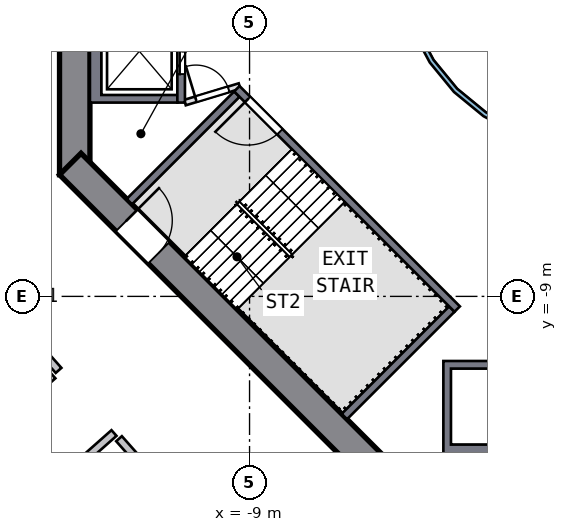
"""IFC4 building model, lengths in metres.
Left out: names, types, materials, properties, quantities, classifications, styles, units other than length and angle.
Written with IfcOpenShell. Run it as: python <this file> out.ifc"""

import sys

from ifc_helpers import new_model, si_unit, direction, frame, frame_2d, origin, place, context, subcontext, project, spatial, polyline, rectangle, outline, extrude, element, fill, save


model = new_model("IFC4")
c1 = context("Model", 3, precision=1e-05, world=origin(), true_north=direction((0.0, 1.0)))
c2 = subcontext(c1, "Body", "Model", "MODEL_VIEW")
j1 = project(units=[si_unit("LENGTHUNIT", "METRE"), si_unit("PLANEANGLEUNIT", "RADIAN")], contexts=[c1])
p1 = place(None, origin())
s1 = spatial("IfcSite", under=j1, at=p1, CompositionType="ELEMENT")
p2 = place(p1, origin())
s2 = spatial("IfcBuilding", under=s1, at=p2, CompositionType="ELEMENT")
p3 = place(p2, frame((0.0, 0.0, 81.0)))
s3 = spatial("IfcBuildingStorey", under=s2, at=p3, CompositionType="ELEMENT", Elevation=81.0)
p4 = place(p3, frame((-13.6, 5.799, 0.0), z_axis=(0.0, 0.0, 1.0), x_axis=(0.0, -1.0, 0.0)))
e1 = element("IfcWall", 1, at=p4, inside=s3, PredefinedType="SHEAR", context=c2, shape_type="SweptSolid", body=[
    extrude(rectangle(XDim=11.598, YDim=0.8, at=frame_2d((5.799, 0.0))), origin(), (0.0, 0.0, 1.0), 5.0),
])
p5 = place(p4, frame((4.899, 0.0, 0.0)))
e2 = element("IfcOpeningElement", 2, at=p5, cuts=e1, PredefinedType="OPENING", context=c2, shape_type="SweptSolid", body=[
    extrude(rectangle(XDim=1.8, YDim=2.1, at=frame_2d((0.9, 1.05))), frame((0.0, 0.41, 0.0), z_axis=(0.0, -1.0, 0.0), x_axis=(1.0, 0.0, 0.0)), (0.0, 0.0, 1.0), 0.82),
])
p6 = place(p3, frame((-13.717, -5.516, 0.0), z_axis=(0.0, 0.0, 1.0), x_axis=(0.707106781, -0.707106781, 0.0)))
e3 = element("IfcWall", 3, at=p6, inside=s3, PredefinedType="SHEAR", context=c2, shape_type="SweptSolid", body=[
    extrude(rectangle(XDim=11.598, YDim=0.8, at=frame_2d((5.799, 0.0))), origin(), (0.0, 0.0, 1.0), 5.0),
])
p7 = place(p6, frame((2.099, 0.0, 0.0)))
e4 = element("IfcOpeningElement", 4, at=p7, cuts=e3, PredefinedType="OPENING", context=c2, shape_type="SweptSolid", body=[
    extrude(rectangle(XDim=1.2, YDim=2.1, at=frame_2d((0.6, 1.05))), frame((0.0, 0.41, 0.0), z_axis=(0.0, -1.0, 0.0), x_axis=(1.0, 0.0, 0.0)), (0.0, 0.0, 1.0), 0.82),
])
p8 = place(p3, origin())
e5 = element("IfcWall", 5, at=p8, inside=s3, PredefinedType="SOLIDWALL", context=c2, shape_type="SweptSolid", body=[
    extrude(outline(polyline([(-13.2, -3.9), (-13.2, -1.2), (-10.9, -1.2), (-10.9, -1.4), (-12.9, -1.4), (-12.9, -3.7), (-10.9, -3.7), (-10.9, -3.9), (-13.2, -3.9)])), origin(), (0.0, 0.0, 1.0), 4.69),
])
p9 = place(p3, frame((-10.8, -1.2, 0.0), z_axis=(0.0, 0.0, 1.0), x_axis=(0.0, -1.0, 0.0)))
e6 = element("IfcWall", 6, at=p9, inside=s3, PredefinedType="SOLIDWALL", context=c2, shape_type="SweptSolid", body=[
    extrude(rectangle(XDim=2.7, YDim=0.2, at=frame_2d((1.35, 0.0))), origin(), (0.0, 0.0, 1.0), 4.69),
])
p10 = place(p9, frame((0.75, 0.0, 0.0)))
e7 = element("IfcOpeningElement", 7, at=p10, cuts=e6, PredefinedType="OPENING", context=c2, shape_type="SweptSolid", body=[
    extrude(rectangle(XDim=1.2, YDim=2.1, at=frame_2d((0.6, 1.05))), frame((0.0, 0.11, 0.0), z_axis=(0.0, -1.0, 0.0), x_axis=(1.0, 0.0, 0.0)), (0.0, 0.0, 1.0), 0.22),
])
p11 = place(p3, origin())
e8 = element("IfcWall", 8, at=p11, inside=s3, PredefinedType="SOLIDWALL", context=c2, shape_type="SweptSolid", body=[
    extrude(outline(polyline([(-1.2, -13.2), (-3.9, -13.2), (-3.9, -10.7), (-1.2, -10.7), (-1.2, -13.2)]), holes=[polyline([(-3.7, -10.9), (-3.7, -12.9), (-1.4, -12.9), (-1.4, -10.9), (-3.7, -10.9)])]), origin(), (0.0, 0.0, 1.0), 4.69),
])
p12 = place(p3, frame((-3.535, -9.334, 0.0), z_axis=(0.0, 0.0, 1.0), x_axis=(-0.707106781, 0.707106781, 0.0)))
e9 = element("IfcWall", 9, at=p12, inside=s3, PredefinedType="SOLIDWALL", context=c2, shape_type="SweptSolid", body=[
    extrude(rectangle(XDim=8.2, YDim=0.2, at=frame_2d((4.1, 0.0))), origin(), (0.0, 0.0, 1.0), 4.69),
])
p13 = place(p12, frame((6.6, 0.0, 0.0)))
e10 = element("IfcOpeningElement", 10, at=p13, cuts=e9, PredefinedType="OPENING", context=c2, shape_type="SweptSolid", body=[
    extrude(rectangle(XDim=1.2, YDim=2.1, at=frame_2d((0.6, 1.05))), frame((0.0, 0.11, 0.0), z_axis=(0.0, -1.0, 0.0), x_axis=(1.0, 0.0, 0.0)), (0.0, 0.0, 1.0), 0.22),
])
for number, where, z_axis, x_axis in (
    (11, (-9.334, -3.677, 0.0), (0.0, 0.0, 1.0), (-0.707, -0.707, 0.0)),
    (12, (-3.677, -9.334, 0.0), (0.0, 0.0, 1.0), (-0.707, -0.707, 0.0)),
):
    element("IfcWall", number, at=place(p3, frame(where, z_axis=z_axis, x_axis=x_axis)), inside=s3, PredefinedType="SOLIDWALL", context=c2, shape_type="SweptSolid", body=[
        extrude(rectangle(XDim=4.0, YDim=0.2, at=frame_2d((2.0, 0.0))), origin(), (0.0, 0.0, 1.0), 4.69),
    ])
p14 = place(p3, frame((-10.7, -3.9, 0.0), z_axis=(0.0, 0.0, 1.0), x_axis=(0.957084567, 0.289808785, 0.0)))
e13 = element("IfcWall", 13, at=p14, inside=s3, PredefinedType="PARTITIONING", context=c2, shape_type="SweptSolid", body=[
    extrude(rectangle(XDim=1.501, YDim=0.15, at=frame_2d((0.75, 0.0))), origin(), (0.0, 0.0, 1.0), 4.69),
])
p15 = place(p14, frame((0.301, 0.0, 0.0)))
e14 = element("IfcOpeningElement", 14, at=p15, cuts=e13, PredefinedType="OPENING", context=c2, shape_type="SweptSolid", body=[
    extrude(rectangle(XDim=0.9, YDim=2.1, at=frame_2d((0.45, 1.05))), frame((0.0, 0.085, 0.0), z_axis=(0.0, -1.0, 0.0), x_axis=(1.0, 0.0, 0.0)), (0.0, 0.0, 1.0), 0.17),
])
p16 = place(p3, origin())
e15 = element("IfcWall", 15, at=p16, inside=s3, PredefinedType="SOLIDWALL", context=c2, shape_type="SweptSolid", body=[
    extrude(outline(polyline([(5.021, -0.999), (4.73, -1.959), (4.257, -2.844), (3.62, -3.62), (2.844, -4.257), (1.959, -4.73), (0.999, -5.021), (0.0, -5.12), (-0.999, -5.021), (-1.959, -4.73), (-2.844, -4.257), (-3.62, -3.62), (-4.257, -2.844), (-4.73, -1.959), (-5.021, -0.999), (-5.12, 0.0), (-5.021, 0.999), (-4.73, 1.959), (-4.257, 2.844), (-3.62, 3.62), (-2.844, 4.257), (-1.959, 4.73), (-0.999, 5.021), (0.0, 5.12), (0.999, 5.021), (1.959, 4.73), (2.844, 4.257), (3.62, 3.62), (4.257, 2.844), (4.73, 1.959), (5.021, 0.999), (5.12, 0.0), (5.021, -0.999)]), holes=[polyline([(4.904, 0.976), (4.619, 1.913), (4.157, 2.778), (3.535, 3.535), (2.778, 4.157), (1.913, 4.619), (0.976, 4.904), (0.0, 5.0), (-0.976, 4.904), (-1.913, 4.619), (-2.778, 4.157), (-3.535, 3.535), (-4.157, 2.778), (-4.619, 1.913), (-4.904, 0.976), (-5.0, 0.0), (-4.904, -0.976), (-4.619, -1.913), (-4.157, -2.778), (-3.535, -3.535), (-2.778, -4.157), (-1.913, -4.619), (-0.976, -4.904), (0.0, -5.0), (0.976, -4.904), (1.913, -4.619), (2.778, -4.157), (3.535, -3.535), (4.157, -2.778), (4.619, -1.913), (4.904, -0.976), (5.0, 0.0), (4.904, 0.976)])]), origin(), (0.0, 0.0, 1.0), 4.69),
])
p17 = place(p3, frame((-29.293, -24.465, 0.0), z_axis=(0.0, 0.0, 1.0), x_axis=(0.74872671, 0.662878808, 0.0)))
e16 = element("IfcWall", 16, at=p17, inside=s3, PredefinedType="SOLIDWALL", context=c2, shape_type="SweptSolid", body=[
    extrude(rectangle(XDim=20.191, YDim=0.2, at=frame_2d((10.096, 0.0))), origin(), (0.0, 0.0, 1.0), 4.69),
])
p18 = place(p17, frame((11.65, 0.0, 0.0)))
e17 = element("IfcOpeningElement", 17, at=p18, cuts=e16, PredefinedType="OPENING", context=c2, shape_type="SweptSolid", body=[
    extrude(rectangle(XDim=1.0, YDim=2.1, at=frame_2d((0.5, 1.05))), frame((0.0, 0.11, 0.0), z_axis=(0.0, -1.0, 0.0), x_axis=(1.0, 0.0, 0.0)), (0.0, 0.0, 1.0), 0.22),
])
p19 = place(p3, frame((-12.567, -12.595, 0.0), z_axis=(0.0, 0.0, 1.0), x_axis=(-0.748724331, -0.662881495, 0.0)))
e18 = element("IfcWall", 18, at=p19, inside=s3, PredefinedType="SOLIDWALL", context=c2, shape_type="SweptSolid", body=[
    extrude(rectangle(XDim=20.392, YDim=0.2, at=frame_2d((10.196, 0.0))), origin(), (0.0, 0.0, 1.0), 4.69),
])
p20 = place(p19, frame((14.9, 0.0, 0.0)))
e19 = element("IfcOpeningElement", 19, at=p20, cuts=e18, PredefinedType="OPENING", context=c2, shape_type="SweptSolid", body=[
    extrude(rectangle(XDim=1.0, YDim=2.1, at=frame_2d((0.5, 1.05))), frame((0.0, 0.11, 0.0), z_axis=(0.0, -1.0, 0.0), x_axis=(1.0, 0.0, 0.0)), (0.0, 0.0, 1.0), 0.22),
])
p21 = place(p3, frame((-16.279, -8.402, 0.0), z_axis=(0.0, 0.0, 1.0), x_axis=(0.66286047, -0.748742945, 0.0)))
e20 = element("IfcWall", 20, at=p21, inside=s3, PredefinedType="SOLIDWALL", context=c2, shape_type="SweptSolid", body=[
    extrude(rectangle(XDim=3.4, YDim=0.2, at=frame_2d((1.7, 0.0))), origin(), (0.0, 0.0, 1.0), 4.69),
])
p22 = place(p3, frame((-12.434, -12.745, 0.0), z_axis=(0.0, 0.0, 1.0), x_axis=(0.662916551, -0.748693293, 0.0)))
e21 = element("IfcWall", 21, at=p22, inside=s3, PredefinedType="SOLIDWALL", context=c2, shape_type="SweptSolid", body=[
    extrude(rectangle(XDim=3.458, YDim=0.2, at=frame_2d((1.729, 0.0))), origin(), (0.0, 0.0, 1.0), 4.69),
])
p23 = place(p10, origin())
e22 = element("IfcDoor", 22, at=p23, inside=s3, OperationType="DOUBLE_DOOR_SLIDING", PredefinedType="DOOR", context=c2, shape_type="SweptSolid", body=[
    extrude(rectangle(XDim=1.2, YDim=2.1, at=frame_2d((0.6, 1.05))), frame((0.0, 0.025, 0.0), z_axis=(0.0, -1.0, 0.0), x_axis=(1.0, 0.0, 0.0)), (0.0, 0.0, 1.0), 0.05),
])
fill(e7, e22)
p24 = place(p13, origin())
e23 = element("IfcDoor", 23, at=p24, inside=s3, OperationType="SINGLE_SWING_RIGHT", PredefinedType="DOOR", context=c2, shape_type="SweptSolid", body=[
    extrude(rectangle(XDim=1.2, YDim=2.1, at=frame_2d((0.6, 1.05))), frame((0.0, 0.025, 0.0), z_axis=(0.0, -1.0, 0.0), x_axis=(1.0, 0.0, 0.0)), (0.0, 0.0, 1.0), 0.05),
])
fill(e10, e23)
p25 = place(p7, origin())
e24 = element("IfcDoor", 24, at=p25, inside=s3, OperationType="SINGLE_SWING_LEFT", PredefinedType="DOOR", context=c2, shape_type="SweptSolid", body=[
    extrude(rectangle(XDim=1.2, YDim=2.1, at=frame_2d((0.6, 1.05))), frame((0.0, 0.025, 0.0), z_axis=(0.0, -1.0, 0.0), x_axis=(1.0, 0.0, 0.0)), (0.0, 0.0, 1.0), 0.05),
])
fill(e4, e24)
p26 = place(p15, origin())
e25 = element("IfcDoor", 25, at=p26, inside=s3, OperationType="SINGLE_SWING_LEFT", PredefinedType="DOOR", context=c2, shape_type="SweptSolid", body=[
    extrude(rectangle(XDim=0.9, YDim=2.1, at=frame_2d((0.45, 1.05))), frame((0.0, 0.025, 0.0), z_axis=(0.0, -1.0, 0.0), x_axis=(1.0, 0.0, 0.0)), (0.0, 0.0, 1.0), 0.05),
])
fill(e14, e25)
save(model, sys.argv[1])
